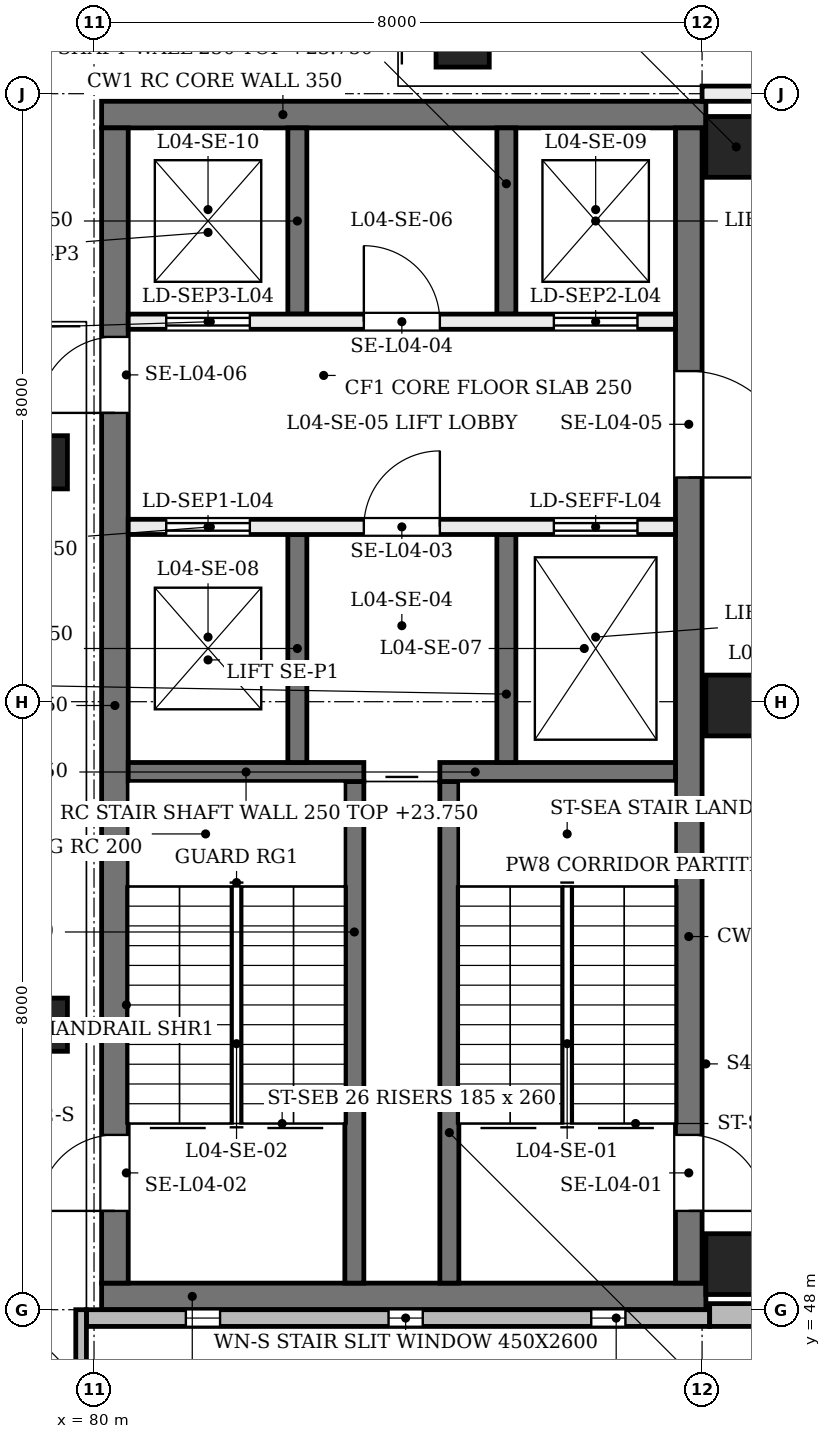
"""IFC4 building model, lengths in metres.
Left out: names, types, materials, properties, quantities, classifications, styles, units other than length and angle.
Written with IfcOpenShell. Run it as: python <this file> out.ifc"""

import sys

from ifc_helpers import new_model, si_unit, direction, frame, frame_2d, origin, origin_2d, place, context, subcontext, project, spatial, rectangle, extrude, element, fill, save


model = new_model("IFC4")
c1 = context("Model", 3, precision=1e-05, world=origin(), true_north=direction((0.0, 1.0)))
c2 = subcontext(c1, "Body", "Model", "MODEL_VIEW")
j1 = project(units=[si_unit("LENGTHUNIT", "METRE"), si_unit("PLANEANGLEUNIT", "RADIAN")], contexts=[c1])
p1 = place(None, origin())
s1 = spatial("IfcSite", under=j1, at=p1, CompositionType="ELEMENT")
p2 = place(p1, origin())
s2 = spatial("IfcBuilding", under=s1, at=p2, CompositionType="ELEMENT")
p3 = place(p2, frame((0.0, 0.0, 19.2)))
s3 = spatial("IfcBuildingStorey", under=s2, at=p3, CompositionType="ELEMENT", Elevation=19.2)
for number, where, z_axis, x_axis in (
    (1, (80.1, 48.175, 0.0), (0.0, 0.0, 1.0), (1.0, 0.0, 0.0)),
    (2, (80.1, 63.725, 0.0), (0.0, 0.0, 1.0), (1.0, 0.0, 0.0)),
):
    element("IfcWall", number, at=place(p3, frame(where, z_axis=z_axis, x_axis=x_axis)), inside=s3, PredefinedType="SHEAR", context=c2, shape_type="SweptSolid", body=[
        extrude(rectangle(XDim=7.95, YDim=0.35, at=frame_2d((3.975, 0.0))), origin(), (0.0, 0.0, 1.0), 4.58),
    ])
p4 = place(p3, frame((80.275, 48.35, 0.0), z_axis=(0.0, 0.0, 1.0), x_axis=(0.0, 1.0, 0.0)))
e3 = element("IfcWall", 3, at=p4, inside=s3, PredefinedType="SHEAR", context=c2, shape_type="SweptSolid", body=[
    extrude(rectangle(XDim=15.2, YDim=0.35, at=frame_2d((7.6, 0.0))), origin(), (0.0, 0.0, 1.0), 4.58),
])
p5 = place(p4, frame((0.95, 0.0, 0.0)))
e4 = element("IfcOpeningElement", 4, at=p5, cuts=e3, PredefinedType="OPENING", context=c2, shape_type="SweptSolid", body=[
    extrude(rectangle(XDim=1.0, YDim=2.1, at=frame_2d((0.5, 1.05))), frame((0.0, 0.185, 0.0), z_axis=(0.0, -1.0, 0.0), x_axis=(1.0, 0.0, 0.0)), (0.0, 0.0, 1.0), 0.37),
])
p6 = place(p4, frame((11.45, 0.0, 0.0)))
e5 = element("IfcOpeningElement", 5, at=p6, cuts=e3, PredefinedType="OPENING", context=c2, shape_type="SweptSolid", body=[
    extrude(rectangle(XDim=1.0, YDim=2.1, at=frame_2d((0.5, 1.05))), frame((0.0, 0.185, 0.0), z_axis=(0.0, -1.0, 0.0), x_axis=(1.0, 0.0, 0.0)), (0.0, 0.0, 1.0), 0.37),
])
p7 = place(p3, frame((87.825, 48.35, 0.0), z_axis=(0.0, 0.0, 1.0), x_axis=(0.0, 1.0, 0.0)))
e6 = element("IfcWall", 6, at=p7, inside=s3, PredefinedType="SHEAR", context=c2, shape_type="SweptSolid", body=[
    extrude(rectangle(XDim=15.2, YDim=0.35, at=frame_2d((7.6, 0.0))), origin(), (0.0, 0.0, 1.0), 4.58),
])
p8 = place(p7, frame((0.95, 0.0, 0.0)))
e7 = element("IfcOpeningElement", 7, at=p8, cuts=e6, PredefinedType="OPENING", context=c2, shape_type="SweptSolid", body=[
    extrude(rectangle(XDim=1.0, YDim=2.1, at=frame_2d((0.5, 1.05))), frame((0.0, 0.185, 0.0), z_axis=(0.0, -1.0, 0.0), x_axis=(1.0, 0.0, 0.0)), (0.0, 0.0, 1.0), 0.37),
])
p9 = place(p7, frame((10.6, 0.0, 0.0)))
e8 = element("IfcOpeningElement", 8, at=p9, cuts=e6, PredefinedType="OPENING", context=c2, shape_type="SweptSolid", body=[
    extrude(rectangle(XDim=1.4, YDim=2.1, at=frame_2d((0.7, 1.05))), frame((0.0, 0.185, 0.0), z_axis=(0.0, -1.0, 0.0), x_axis=(1.0, 0.0, 0.0)), (0.0, 0.0, 1.0), 0.37),
])
for number, where, z_axis, x_axis in (
    (9, (88.45, 48.6, 0.0), (0.0, 0.0, 1.0), (1.0, 0.0, 0.0)),
    (10, (88.45, 55.95, 0.0), (0.0, 0.0, 1.0), (1.0, 0.0, 0.0)),
    (11, (88.45, 63.3, 0.0), (0.0, 0.0, 1.0), (1.0, 0.0, 0.0)),
):
    element("IfcColumn", number, at=place(p3, frame(where, z_axis=z_axis, x_axis=x_axis)), inside=s3, PredefinedType="COLUMN", context=c2, shape_type="SweptSolid", body=[
        extrude(rectangle(XDim=0.8, YDim=0.8, at=origin_2d()), origin(), (0.0, 0.0, 1.0), 4.8),
    ])
for number, where, z_axis, x_axis in (
    (12, (79.3, 52.0, 0.0), (0.0, -0.204, 0.979), (1.0, 0.0, 0.0)),
    (13, (79.3, 59.4, 0.0), (0.0, -0.204, 0.979), (1.0, 0.0, 0.0)),
):
    element("IfcColumn", number, at=place(p3, frame(where, z_axis=z_axis, x_axis=x_axis)), inside=s3, PredefinedType="COLUMN", context=c2, shape_type="SweptSolid", body=[
        extrude(rectangle(XDim=0.7, YDim=0.7, at=origin_2d()), origin(), (0.0, 0.0, 1.0), 4.903),
    ])
p10 = place(p3, frame((84.6, 64.7, 0.0), z_axis=(0.203937582782, 0.0, 0.978983892783), x_axis=(0.0, 1.0, 0.0)))
e14 = element("IfcColumn", 14, at=p10, inside=s3, PredefinedType="COLUMN", context=c2, shape_type="SweptSolid", body=[
    extrude(rectangle(XDim=0.7, YDim=0.7, at=origin_2d()), origin(), (0.0, 0.0, 1.0), 4.678),
])
p11 = place(p3, frame((79.9, 47.89, 0.0), z_axis=(0.0, 0.0, 1.0), x_axis=(1.0, 0.0, 0.0)))
e15 = element("IfcWall", 15, at=p11, inside=s3, PredefinedType="SOLIDWALL", context=c2, shape_type="SweptSolid", body=[
    extrude(rectangle(XDim=8.2, YDim=0.22, at=frame_2d((4.1, 0.0))), origin(), (0.0, 0.0, 1.0), 3.9),
])
p12 = place(p11, frame((1.308, 0.0, 0.9)))
e16 = element("IfcOpeningElement", 16, at=p12, cuts=e15, PredefinedType="OPENING", context=c2, shape_type="SweptSolid", body=[
    extrude(rectangle(XDim=0.45, YDim=2.6, at=frame_2d((0.225, 1.3))), frame((0.0, 0.12, 0.0), z_axis=(0.0, -1.0, 0.0), x_axis=(1.0, 0.0, 0.0)), (0.0, 0.0, 1.0), 0.24),
])
p13 = place(p11, frame((3.975, 0.0, 0.9)))
e17 = element("IfcOpeningElement", 17, at=p13, cuts=e15, PredefinedType="OPENING", context=c2, shape_type="SweptSolid", body=[
    extrude(rectangle(XDim=0.45, YDim=2.6, at=frame_2d((0.225, 1.3))), frame((0.0, 0.12, 0.0), z_axis=(0.0, -1.0, 0.0), x_axis=(1.0, 0.0, 0.0)), (0.0, 0.0, 1.0), 0.24),
])
p14 = place(p11, frame((6.642, 0.0, 0.9)))
e18 = element("IfcOpeningElement", 18, at=p14, cuts=e15, PredefinedType="OPENING", context=c2, shape_type="SweptSolid", body=[
    extrude(rectangle(XDim=0.45, YDim=2.6, at=frame_2d((0.225, 1.3))), frame((0.0, 0.12, 0.0), z_axis=(0.0, -1.0, 0.0), x_axis=(1.0, 0.0, 0.0)), (0.0, 0.0, 1.0), 0.24),
])
p15 = place(p3, frame((88.1, 47.93, 0.0), z_axis=(0.0, 0.0, 1.0), x_axis=(1.0, 0.0, 0.0)))
e19 = element("IfcWall", 19, at=p15, inside=s3, PredefinedType="SOLIDWALL", context=c2, shape_type="SweptSolid", body=[
    extrude(rectangle(XDim=7.9, YDim=0.3, at=frame_2d((3.95, 0.0))), origin(), (0.0, 0.0, 1.0), 3.9),
])
p16 = place(p15, frame((0.717, 0.0, 0.75)))
e20 = element("IfcOpeningElement", 20, at=p16, cuts=e19, PredefinedType="OPENING", context=c2, shape_type="SweptSolid", body=[
    extrude(rectangle(XDim=1.2, YDim=3.1, at=frame_2d((0.6, 1.55))), frame((0.0, 0.16, 0.0), z_axis=(0.0, -1.0, 0.0), x_axis=(1.0, 0.0, 0.0)), (0.0, 0.0, 1.0), 0.32),
])
p17 = place(p15, frame((3.35, 0.0, 0.75)))
e21 = element("IfcOpeningElement", 21, at=p17, cuts=e19, PredefinedType="OPENING", context=c2, shape_type="SweptSolid", body=[
    extrude(rectangle(XDim=1.2, YDim=3.1, at=frame_2d((0.6, 1.55))), frame((0.0, 0.16, 0.0), z_axis=(0.0, -1.0, 0.0), x_axis=(1.0, 0.0, 0.0)), (0.0, 0.0, 1.0), 0.32),
])
p18 = place(p15, frame((5.983, 0.0, 0.75)))
e22 = element("IfcOpeningElement", 22, at=p18, cuts=e19, PredefinedType="OPENING", context=c2, shape_type="SweptSolid", body=[
    extrude(rectangle(XDim=1.2, YDim=3.1, at=frame_2d((0.6, 1.55))), frame((0.0, 0.16, 0.0), z_axis=(0.0, -1.0, 0.0), x_axis=(1.0, 0.0, 0.0)), (0.0, 0.0, 1.0), 0.32),
])
p19 = place(p3, frame((79.83, 44.0, 0.0), z_axis=(0.0, 0.0, 1.0), x_axis=(0.0, 1.0, 0.0)))
e23 = element("IfcWall", 23, at=p19, inside=s3, PredefinedType="SOLIDWALL", context=c2, shape_type="SweptSolid", body=[
    extrude(rectangle(XDim=4.0, YDim=0.14, at=frame_2d((2.0, 0.0))), origin(), (0.0, 0.0, 1.0), 3.9),
])
for number, where, z_axis, x_axis in (
    (24, (84.675, 48.35, 0.0), (0.0, 0.0, 1.0), (0.0, 1.0, 0.0)),
    (25, (83.425, 48.35, 0.0), (0.0, 0.0, 1.0), (0.0, 1.0, 0.0)),
):
    element("IfcWall", number, at=place(p3, frame(where, z_axis=z_axis, x_axis=x_axis)), inside=s3, PredefinedType="SOLIDWALL", context=c2, shape_type="SweptSolid", body=[
        extrude(rectangle(XDim=6.6, YDim=0.25, at=frame_2d((3.3, 0.0))), origin(), (0.0, 0.0, 1.0), 4.55),
    ])
p20 = place(p3, frame((87.65, 55.075, 0.0), z_axis=(0.0, 0.0, 1.0), x_axis=(-1.0, 0.0, 0.0)))
e26 = element("IfcWall", 26, at=p20, inside=s3, PredefinedType="SOLIDWALL", context=c2, shape_type="SweptSolid", body=[
    extrude(rectangle(XDim=3.1, YDim=0.25, at=frame_2d((1.55, 0.0))), origin(), (0.0, 0.0, 1.0), 4.55),
])
p21 = place(p3, frame((83.55, 55.075, 0.0), z_axis=(0.0, 0.0, 1.0), x_axis=(-1.0, 0.0, 0.0)))
e27 = element("IfcWall", 27, at=p21, inside=s3, PredefinedType="SOLIDWALL", context=c2, shape_type="SweptSolid", body=[
    extrude(rectangle(XDim=3.1, YDim=0.25, at=frame_2d((1.55, 0.0))), origin(), (0.0, 0.0, 1.0), 4.55),
])
p22 = place(p3, frame((85.425, 55.2, 0.0), z_axis=(0.0, 0.0, 1.0), x_axis=(0.0, 1.0, 0.0)))
e28 = element("IfcWall", 28, at=p22, inside=s3, PredefinedType="SOLIDWALL", context=c2, shape_type="SweptSolid", body=[
    extrude(rectangle(XDim=3.0, YDim=0.25, at=frame_2d((1.5, 0.0))), origin(), (0.0, 0.0, 1.0), 4.55),
])
p23 = place(p3, frame((85.425, 61.1, 0.0), z_axis=(0.0, 0.0, 1.0), x_axis=(0.0, 1.0, 0.0)))
e29 = element("IfcWall", 29, at=p23, inside=s3, PredefinedType="SOLIDWALL", context=c2, shape_type="SweptSolid", body=[
    extrude(rectangle(XDim=2.45, YDim=0.25, at=frame_2d((1.225, 0.0))), origin(), (0.0, 0.0, 1.0), 4.55),
])
p24 = place(p3, frame((82.675, 55.2, 0.0), z_axis=(0.0, 0.0, 1.0), x_axis=(0.0, 1.0, 0.0)))
e30 = element("IfcWall", 30, at=p24, inside=s3, PredefinedType="SOLIDWALL", context=c2, shape_type="SweptSolid", body=[
    extrude(rectangle(XDim=3.0, YDim=0.25, at=frame_2d((1.5, 0.0))), origin(), (0.0, 0.0, 1.0), 4.55),
])
p25 = place(p3, frame((82.675, 61.1, 0.0), z_axis=(0.0, 0.0, 1.0), x_axis=(0.0, 1.0, 0.0)))
e31 = element("IfcWall", 31, at=p25, inside=s3, PredefinedType="SOLIDWALL", context=c2, shape_type="SweptSolid", body=[
    extrude(rectangle(XDim=2.45, YDim=0.25, at=frame_2d((1.225, 0.0))), origin(), (0.0, 0.0, 1.0), 4.55),
])
p26 = place(p3, frame((87.65, 58.3, 0.0), z_axis=(0.0, 0.0, 1.0), x_axis=(-1.0, 0.0, 0.0)))
e32 = element("IfcWall", 32, at=p26, inside=s3, PredefinedType="SOLIDWALL", context=c2, shape_type="SweptSolid", body=[
    extrude(rectangle(XDim=7.2, YDim=0.2, at=frame_2d((3.6, 0.0))), origin(), (0.0, 0.0, 1.0), 4.55),
])
p27 = place(p26, frame((0.5, 0.0, 0.0)))
e33 = element("IfcOpeningElement", 33, at=p27, cuts=e32, PredefinedType="OPENING", context=c2, shape_type="SweptSolid", body=[
    extrude(rectangle(XDim=1.1, YDim=2.1, at=frame_2d((0.55, 1.05))), frame((0.0, 0.11, 0.0), z_axis=(0.0, -1.0, 0.0), x_axis=(1.0, 0.0, 0.0)), (0.0, 0.0, 1.0), 0.22),
])
p28 = place(p26, frame((5.6, 0.0, 0.0)))
e34 = element("IfcOpeningElement", 34, at=p28, cuts=e32, PredefinedType="OPENING", context=c2, shape_type="SweptSolid", body=[
    extrude(rectangle(XDim=1.1, YDim=2.1, at=frame_2d((0.55, 1.05))), frame((0.0, 0.11, 0.0), z_axis=(0.0, -1.0, 0.0), x_axis=(1.0, 0.0, 0.0)), (0.0, 0.0, 1.0), 0.22),
])
p29 = place(p26, frame((3.1, 0.0, 0.0)))
e35 = element("IfcOpeningElement", 35, at=p29, cuts=e32, PredefinedType="OPENING", context=c2, shape_type="SweptSolid", body=[
    extrude(rectangle(XDim=1.0, YDim=2.1, at=frame_2d((0.5, 1.05))), frame((0.0, 0.11, 0.0), z_axis=(0.0, -1.0, 0.0), x_axis=(1.0, 0.0, 0.0)), (0.0, 0.0, 1.0), 0.22),
])
p30 = place(p3, frame((87.65, 61.0, 0.0), z_axis=(0.0, 0.0, 1.0), x_axis=(-1.0, 0.0, 0.0)))
e36 = element("IfcWall", 36, at=p30, inside=s3, PredefinedType="SOLIDWALL", context=c2, shape_type="SweptSolid", body=[
    extrude(rectangle(XDim=7.2, YDim=0.2, at=frame_2d((3.6, 0.0))), origin(), (0.0, 0.0, 1.0), 4.55),
])
p31 = place(p30, frame((0.5, 0.0, 0.0)))
e37 = element("IfcOpeningElement", 37, at=p31, cuts=e36, PredefinedType="OPENING", context=c2, shape_type="SweptSolid", body=[
    extrude(rectangle(XDim=1.1, YDim=2.1, at=frame_2d((0.55, 1.05))), frame((0.0, 0.11, 0.0), z_axis=(0.0, -1.0, 0.0), x_axis=(1.0, 0.0, 0.0)), (0.0, 0.0, 1.0), 0.22),
])
p32 = place(p30, frame((5.6, 0.0, 0.0)))
e38 = element("IfcOpeningElement", 38, at=p32, cuts=e36, PredefinedType="OPENING", context=c2, shape_type="SweptSolid", body=[
    extrude(rectangle(XDim=1.1, YDim=2.1, at=frame_2d((0.55, 1.05))), frame((0.0, 0.11, 0.0), z_axis=(0.0, -1.0, 0.0), x_axis=(1.0, 0.0, 0.0)), (0.0, 0.0, 1.0), 0.22),
])
p33 = place(p30, frame((3.1, 0.0, 0.0)))
e39 = element("IfcOpeningElement", 39, at=p33, cuts=e36, PredefinedType="OPENING", context=c2, shape_type="SweptSolid", body=[
    extrude(rectangle(XDim=1.0, YDim=2.1, at=frame_2d((0.5, 1.05))), frame((0.0, 0.11, 0.0), z_axis=(0.0, -1.0, 0.0), x_axis=(1.0, 0.0, 0.0)), (0.0, 0.0, 1.0), 0.22),
])
p34 = place(p3, frame((88.0, 64.0, 0.0), z_axis=(0.0, 0.0, 1.0), x_axis=(1.0, 0.0, 0.0)))
e40 = element("IfcWall", 40, at=p34, inside=s3, PredefinedType="PARTITIONING", context=c2, shape_type="SweptSolid", body=[
    extrude(rectangle(XDim=3.6, YDim=0.2, at=frame_2d((1.8, 0.0))), origin(), (0.0, 0.0, 1.0), 3.88),
])
p35 = place(p34, frame((1.0, 0.0, 0.0)))
e41 = element("IfcOpeningElement", 41, at=p35, cuts=e40, PredefinedType="OPENING", context=c2, shape_type="SweptSolid", body=[
    extrude(rectangle(XDim=1.6, YDim=2.1, at=frame_2d((0.8, 1.05))), frame((0.0, 0.11, 0.0), z_axis=(0.0, -1.0, 0.0), x_axis=(1.0, 0.0, 0.0)), (0.0, 0.0, 1.0), 0.22),
])
p36 = place(p12, origin())
e42 = element("IfcWindow", 42, at=p36, inside=s3, PartitioningType="SINGLE_PANEL", PredefinedType="WINDOW", context=c2, shape_type="SweptSolid", body=[
    extrude(rectangle(XDim=0.45, YDim=2.6, at=frame_2d((0.225, 1.3))), frame((0.0, 0.03, 0.0), z_axis=(0.0, -1.0, 0.0), x_axis=(1.0, 0.0, 0.0)), (0.0, 0.0, 1.0), 0.06),
])
fill(e16, e42)
p37 = place(p13, origin())
e43 = element("IfcWindow", 43, at=p37, inside=s3, PartitioningType="SINGLE_PANEL", PredefinedType="WINDOW", context=c2, shape_type="SweptSolid", body=[
    extrude(rectangle(XDim=0.45, YDim=2.6, at=frame_2d((0.225, 1.3))), frame((0.0, 0.03, 0.0), z_axis=(0.0, -1.0, 0.0), x_axis=(1.0, 0.0, 0.0)), (0.0, 0.0, 1.0), 0.06),
])
fill(e17, e43)
p38 = place(p14, origin())
e44 = element("IfcWindow", 44, at=p38, inside=s3, PartitioningType="SINGLE_PANEL", PredefinedType="WINDOW", context=c2, shape_type="SweptSolid", body=[
    extrude(rectangle(XDim=0.45, YDim=2.6, at=frame_2d((0.225, 1.3))), frame((0.0, 0.03, 0.0), z_axis=(0.0, -1.0, 0.0), x_axis=(1.0, 0.0, 0.0)), (0.0, 0.0, 1.0), 0.06),
])
fill(e18, e44)
p39 = place(p8, frame((1.0, 0.0, 0.0), z_axis=(0.0, 0.0, 1.0), x_axis=(-1.0, 0.0, 0.0)))
e45 = element("IfcDoor", 45, at=p39, inside=s3, OperationType="SINGLE_SWING_LEFT", PredefinedType="DOOR", context=c2, shape_type="SweptSolid", body=[
    extrude(rectangle(XDim=1.0, YDim=2.1, at=frame_2d((0.5, 1.05))), frame((0.0, 0.025, 0.0), z_axis=(0.0, -1.0, 0.0), x_axis=(1.0, 0.0, 0.0)), (0.0, 0.0, 1.0), 0.05),
])
fill(e7, e45)
p40 = place(p5, origin())
e46 = element("IfcDoor", 46, at=p40, inside=s3, OperationType="SINGLE_SWING_LEFT", PredefinedType="DOOR", context=c2, shape_type="SweptSolid", body=[
    extrude(rectangle(XDim=1.0, YDim=2.1, at=frame_2d((0.5, 1.05))), frame((0.0, 0.025, 0.0), z_axis=(0.0, -1.0, 0.0), x_axis=(1.0, 0.0, 0.0)), (0.0, 0.0, 1.0), 0.05),
])
fill(e4, e46)
p41 = place(p27, frame((1.1, 0.0, 0.0), z_axis=(0.0, 0.0, 1.0), x_axis=(-1.0, 0.0, 0.0)))
e47 = element("IfcDoor", 47, at=p41, inside=s3, OperationType="DOUBLE_DOOR_SLIDING", PredefinedType="DOOR", context=c2, shape_type="SweptSolid", body=[
    extrude(rectangle(XDim=1.1, YDim=2.1, at=frame_2d((0.55, 1.05))), frame((0.0, 0.025, 0.0), z_axis=(0.0, -1.0, 0.0), x_axis=(1.0, 0.0, 0.0)), (0.0, 0.0, 1.0), 0.05),
])
fill(e33, e47)
p42 = place(p28, frame((1.1, 0.0, 0.0), z_axis=(0.0, 0.0, 1.0), x_axis=(-1.0, 0.0, 0.0)))
e48 = element("IfcDoor", 48, at=p42, inside=s3, OperationType="DOUBLE_DOOR_SLIDING", PredefinedType="DOOR", context=c2, shape_type="SweptSolid", body=[
    extrude(rectangle(XDim=1.1, YDim=2.1, at=frame_2d((0.55, 1.05))), frame((0.0, 0.025, 0.0), z_axis=(0.0, -1.0, 0.0), x_axis=(1.0, 0.0, 0.0)), (0.0, 0.0, 1.0), 0.05),
])
fill(e34, e48)
p43 = place(p31, origin())
e49 = element("IfcDoor", 49, at=p43, inside=s3, OperationType="DOUBLE_DOOR_SLIDING", PredefinedType="DOOR", context=c2, shape_type="SweptSolid", body=[
    extrude(rectangle(XDim=1.1, YDim=2.1, at=frame_2d((0.55, 1.05))), frame((0.0, 0.025, 0.0), z_axis=(0.0, -1.0, 0.0), x_axis=(1.0, 0.0, 0.0)), (0.0, 0.0, 1.0), 0.05),
])
fill(e37, e49)
p44 = place(p32, origin())
e50 = element("IfcDoor", 50, at=p44, inside=s3, OperationType="DOUBLE_DOOR_SLIDING", PredefinedType="DOOR", context=c2, shape_type="SweptSolid", body=[
    extrude(rectangle(XDim=1.1, YDim=2.1, at=frame_2d((0.55, 1.05))), frame((0.0, 0.025, 0.0), z_axis=(0.0, -1.0, 0.0), x_axis=(1.0, 0.0, 0.0)), (0.0, 0.0, 1.0), 0.05),
])
fill(e38, e50)
p45 = place(p29, frame((1.0, 0.0, 0.0), z_axis=(0.0, 0.0, 1.0), x_axis=(-1.0, 0.0, 0.0)))
e51 = element("IfcDoor", 51, at=p45, inside=s3, OperationType="SINGLE_SWING_LEFT", PredefinedType="DOOR", context=c2, shape_type="SweptSolid", body=[
    extrude(rectangle(XDim=1.0, YDim=2.1, at=frame_2d((0.5, 1.05))), frame((0.0, 0.025, 0.0), z_axis=(0.0, -1.0, 0.0), x_axis=(1.0, 0.0, 0.0)), (0.0, 0.0, 1.0), 0.05),
])
fill(e35, e51)
p46 = place(p33, origin())
e52 = element("IfcDoor", 52, at=p46, inside=s3, OperationType="SINGLE_SWING_RIGHT", PredefinedType="DOOR", context=c2, shape_type="SweptSolid", body=[
    extrude(rectangle(XDim=1.0, YDim=2.1, at=frame_2d((0.5, 1.05))), frame((0.0, 0.025, 0.0), z_axis=(0.0, -1.0, 0.0), x_axis=(1.0, 0.0, 0.0)), (0.0, 0.0, 1.0), 0.05),
])
fill(e39, e52)
p47 = place(p9, frame((1.4, 0.0, 0.0), z_axis=(0.0, 0.0, 1.0), x_axis=(-1.0, 0.0, 0.0)))
e53 = element("IfcDoor", 53, at=p47, inside=s3, OperationType="SINGLE_SWING_LEFT", PredefinedType="DOOR", context=c2, shape_type="SweptSolid", body=[
    extrude(rectangle(XDim=1.4, YDim=2.1, at=frame_2d((0.7, 1.05))), frame((0.0, 0.025, 0.0), z_axis=(0.0, -1.0, 0.0), x_axis=(1.0, 0.0, 0.0)), (0.0, 0.0, 1.0), 0.05),
])
fill(e8, e53)
p48 = place(p6, origin())
e54 = element("IfcDoor", 54, at=p48, inside=s3, OperationType="SINGLE_SWING_LEFT", PredefinedType="DOOR", context=c2, shape_type="SweptSolid", body=[
    extrude(rectangle(XDim=1.0, YDim=2.1, at=frame_2d((0.5, 1.05))), frame((0.0, 0.025, 0.0), z_axis=(0.0, -1.0, 0.0), x_axis=(1.0, 0.0, 0.0)), (0.0, 0.0, 1.0), 0.05),
])
fill(e5, e54)
save(model, sys.argv[1])
